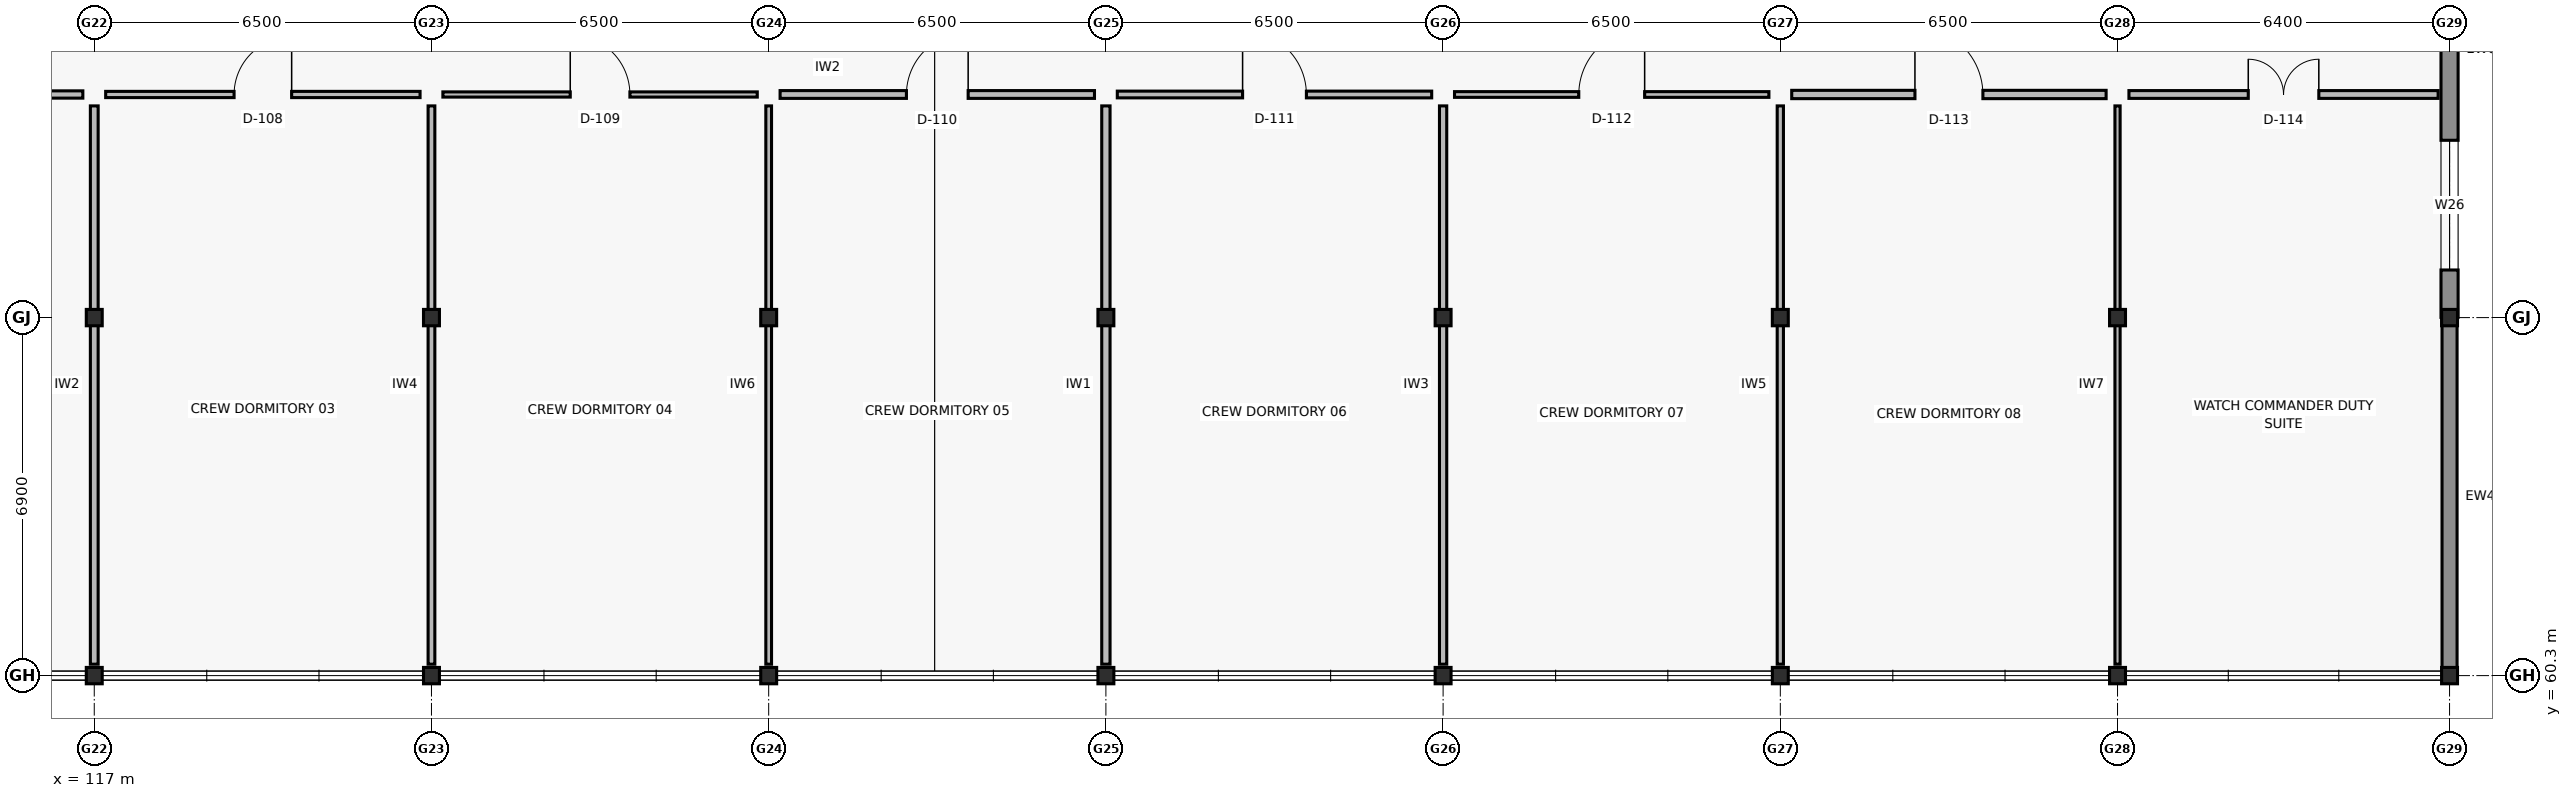
"""IFC4 building model, lengths in metres.
Left out: names, types, materials, properties, quantities, classifications, styles, units other than length and angle.
Written with IfcOpenShell. Run it as: python <this file> out.ifc"""

import sys

from ifc_helpers import new_model, si_unit, direction, frame, frame_2d, origin, origin_2d, place, context, subcontext, project, spatial, rectangle, i_section, extrude, element, fill, save


model = new_model("IFC4")
c1 = context("Model", 3, precision=1e-05, world=origin(), true_north=direction((0.0, 1.0)))
c2 = subcontext(c1, "Body", "Model", "MODEL_VIEW")
j1 = project(units=[si_unit("LENGTHUNIT", "METRE"), si_unit("PLANEANGLEUNIT", "RADIAN")], contexts=[c1])
p1 = place(None, origin())
s1 = spatial("IfcSite", under=j1, at=p1, CompositionType="ELEMENT")
p2 = place(p1, origin())
s2 = spatial("IfcBuilding", under=s1, at=p2, CompositionType="ELEMENT")
p3 = place(p2, frame((0.0, 0.0, 9.6)))
s3 = spatial("IfcBuildingStorey", under=s2, at=p3, CompositionType="ELEMENT", Elevation=9.6)
for number, where, z_axis, x_axis in (
    (1, (117.0, 60.3, 0.0), (0.0, 0.0, 1.0), (1.0, 0.0, 0.0)),
    (2, (117.0, 67.2, 0.0), (0.0, 0.0, 1.0), (1.0, 0.0, 0.0)),
    (3, (123.5, 60.3, 0.0), (0.0, 0.0, 1.0), (1.0, 0.0, 0.0)),
    (4, (123.5, 67.2, 0.0), (0.0, 0.0, 1.0), (1.0, 0.0, 0.0)),
    (5, (130.0, 60.3, 0.0), (0.0, 0.0, 1.0), (1.0, 0.0, 0.0)),
    (6, (130.0, 67.2, 0.0), (0.0, 0.0, 1.0), (1.0, 0.0, 0.0)),
    (7, (136.5, 60.3, 0.0), (0.0, 0.0, 1.0), (1.0, 0.0, 0.0)),
    (8, (136.5, 67.2, 0.0), (0.0, 0.0, 1.0), (1.0, 0.0, 0.0)),
    (9, (143.0, 60.3, 0.0), (0.0, 0.0, 1.0), (1.0, 0.0, 0.0)),
    (10, (143.0, 67.2, 0.0), (0.0, 0.0, 1.0), (1.0, 0.0, 0.0)),
    (11, (149.5, 60.3, 0.0), (0.0, 0.0, 1.0), (1.0, 0.0, 0.0)),
    (12, (149.5, 67.2, 0.0), (0.0, 0.0, 1.0), (1.0, 0.0, 0.0)),
    (13, (156.0, 60.3, 0.0), (0.0, 0.0, 1.0), (1.0, 0.0, 0.0)),
    (14, (156.0, 67.2, 0.0), (0.0, 0.0, 1.0), (1.0, 0.0, 0.0)),
    (15, (162.4, 60.3, 0.0), (0.0, 0.0, 1.0), (1.0, 0.0, 0.0)),
    (16, (162.4, 67.2, 0.0), (0.0, 0.0, 1.0), (1.0, 0.0, 0.0)),
):
    element("IfcColumn", number, at=place(p3, frame(where, z_axis=z_axis, x_axis=x_axis)), inside=s3, PredefinedType="COLUMN", context=c2, shape_type="SweptSolid", body=[
        extrude(i_section(OverallWidth=0.307, OverallDepth=0.315, WebThickness=0.012, FlangeThickness=0.019, FilletRadius=0.017, at=origin_2d()), origin(), (0.0, 0.0, 1.0), 3.9),
    ])
p4 = place(p3, frame((162.4, 67.195, 0.0), z_axis=(0.0, 0.0, 1.0), x_axis=(0.0, -1.0, 0.0)))
e17 = element("IfcWall", 17, at=p4, inside=s3, PredefinedType="SOLIDWALL", context=c2, shape_type="SweptSolid", body=[
    extrude(rectangle(XDim=6.89, YDim=0.29, at=frame_2d((3.445, 0.0))), origin(), (0.0, 0.0, 1.0), 3.02),
])
p5 = place(p3, frame((162.4, 74.095, 0.0), z_axis=(0.0, 0.0, 1.0), x_axis=(0.0, -1.0, 0.0)))
e18 = element("IfcWall", 18, at=p5, inside=s3, PredefinedType="SOLIDWALL", context=c2, shape_type="SweptSolid", body=[
    extrude(rectangle(XDim=6.89, YDim=0.33, at=frame_2d((3.445, 0.0))), origin(), (0.0, 0.0, 1.0), 3.02),
])
p6 = place(p5, frame((3.478, 0.0, 0.8)))
e19 = element("IfcOpeningElement", 19, at=p6, cuts=e18, PredefinedType="OPENING", context=c2, shape_type="SweptSolid", body=[
    extrude(rectangle(XDim=2.5, YDim=1.15, at=frame_2d((1.25, 0.575))), frame((0.0, 0.175, 0.0), z_axis=(0.0, -1.0, 0.0), x_axis=(1.0, 0.0, 0.0)), (0.0, 0.0, 1.0), 0.35),
])
p7 = place(p3, frame((117.0, 60.52, 0.0), z_axis=(0.0, 0.0, 1.0), x_axis=(0.0, 1.0, 0.0)))
e20 = element("IfcWall", 20, at=p7, inside=s3, PredefinedType="PARTITIONING", context=c2, shape_type="SweptSolid", body=[
    extrude(rectangle(XDim=10.76, YDim=0.15, at=frame_2d((5.38, 0.0))), origin(), (0.0, 0.0, 1.0), 3.0),
])
p8 = place(p3, frame((110.72, 71.5, 0.0), z_axis=(0.0, 0.0, 1.0), x_axis=(1.0, 0.0, 0.0)))
e21 = element("IfcWall", 21, at=p8, inside=s3, PredefinedType="PARTITIONING", context=c2, shape_type="SweptSolid", body=[
    extrude(rectangle(XDim=6.06, YDim=0.14, at=frame_2d((3.03, 0.0))), origin(), (0.0, 0.0, 1.0), 3.0),
])
p9 = place(p8, frame((2.495, 0.0, 0.0)))
e22 = element("IfcOpeningElement", 22, at=p9, cuts=e21, PredefinedType="OPENING", context=c2, shape_type="SweptSolid", body=[
    extrude(rectangle(XDim=1.07, YDim=2.08, at=frame_2d((0.535, 1.04))), frame((0.0, 0.08, 0.0), z_axis=(0.0, -1.0, 0.0), x_axis=(1.0, 0.0, 0.0)), (0.0, 0.0, 1.0), 0.16),
])
p10 = place(p3, frame((123.5, 60.52, 0.0), z_axis=(0.0, 0.0, 1.0), x_axis=(0.0, 1.0, 0.0)))
e23 = element("IfcWall", 23, at=p10, inside=s3, PredefinedType="PARTITIONING", context=c2, shape_type="SweptSolid", body=[
    extrude(rectangle(XDim=10.76, YDim=0.13, at=frame_2d((5.38, 0.0))), origin(), (0.0, 0.0, 1.0), 3.0),
])
p11 = place(p3, frame((117.22, 71.5, 0.0), z_axis=(0.0, 0.0, 1.0), x_axis=(1.0, 0.0, 0.0)))
e24 = element("IfcWall", 24, at=p11, inside=s3, PredefinedType="PARTITIONING", context=c2, shape_type="SweptSolid", body=[
    extrude(rectangle(XDim=6.06, YDim=0.12, at=frame_2d((3.03, 0.0))), origin(), (0.0, 0.0, 1.0), 3.0),
])
p12 = place(p11, frame((2.475, 0.0, 0.0)))
e25 = element("IfcOpeningElement", 25, at=p12, cuts=e24, PredefinedType="OPENING", context=c2, shape_type="SweptSolid", body=[
    extrude(rectangle(XDim=1.11, YDim=2.1, at=frame_2d((0.555, 1.05))), frame((0.0, 0.07, 0.0), z_axis=(0.0, -1.0, 0.0), x_axis=(1.0, 0.0, 0.0)), (0.0, 0.0, 1.0), 0.14),
])
p13 = place(p3, frame((130.0, 60.52, 0.0), z_axis=(0.0, 0.0, 1.0), x_axis=(0.0, 1.0, 0.0)))
e26 = element("IfcWall", 26, at=p13, inside=s3, PredefinedType="PARTITIONING", context=c2, shape_type="SweptSolid", body=[
    extrude(rectangle(XDim=10.76, YDim=0.11, at=frame_2d((5.38, 0.0))), origin(), (0.0, 0.0, 1.0), 3.0),
])
p14 = place(p3, frame((123.72, 71.5, 0.0), z_axis=(0.0, 0.0, 1.0), x_axis=(1.0, 0.0, 0.0)))
e27 = element("IfcWall", 27, at=p14, inside=s3, PredefinedType="PARTITIONING", context=c2, shape_type="SweptSolid", body=[
    extrude(rectangle(XDim=6.06, YDim=0.1, at=frame_2d((3.03, 0.0))), origin(), (0.0, 0.0, 1.0), 3.0),
])
p15 = place(p14, frame((2.455, 0.0, 0.0)))
e28 = element("IfcOpeningElement", 28, at=p15, cuts=e27, PredefinedType="OPENING", context=c2, shape_type="SweptSolid", body=[
    extrude(rectangle(XDim=1.15, YDim=2.12, at=frame_2d((0.575, 1.06))), frame((0.0, 0.06, 0.0), z_axis=(0.0, -1.0, 0.0), x_axis=(1.0, 0.0, 0.0)), (0.0, 0.0, 1.0), 0.12),
])
p16 = place(p3, frame((136.5, 60.52, 0.0), z_axis=(0.0, 0.0, 1.0), x_axis=(0.0, 1.0, 0.0)))
e29 = element("IfcWall", 29, at=p16, inside=s3, PredefinedType="PARTITIONING", context=c2, shape_type="SweptSolid", body=[
    extrude(rectangle(XDim=10.76, YDim=0.16, at=frame_2d((5.38, 0.0))), origin(), (0.0, 0.0, 1.0), 3.0),
])
p17 = place(p3, frame((130.22, 71.5, 0.0), z_axis=(0.0, 0.0, 1.0), x_axis=(1.0, 0.0, 0.0)))
e30 = element("IfcWall", 30, at=p17, inside=s3, PredefinedType="PARTITIONING", context=c2, shape_type="SweptSolid", body=[
    extrude(rectangle(XDim=6.06, YDim=0.15, at=frame_2d((3.03, 0.0))), origin(), (0.0, 0.0, 1.0), 3.0),
])
p18 = place(p17, frame((2.435, 0.0, 0.0)))
e31 = element("IfcOpeningElement", 31, at=p18, cuts=e30, PredefinedType="OPENING", context=c2, shape_type="SweptSolid", body=[
    extrude(rectangle(XDim=1.19, YDim=2.14, at=frame_2d((0.595, 1.07))), frame((0.0, 0.085, 0.0), z_axis=(0.0, -1.0, 0.0), x_axis=(1.0, 0.0, 0.0)), (0.0, 0.0, 1.0), 0.17),
])
p19 = place(p3, frame((143.0, 60.52, 0.0), z_axis=(0.0, 0.0, 1.0), x_axis=(0.0, 1.0, 0.0)))
e32 = element("IfcWall", 32, at=p19, inside=s3, PredefinedType="PARTITIONING", context=c2, shape_type="SweptSolid", body=[
    extrude(rectangle(XDim=10.76, YDim=0.14, at=frame_2d((5.38, 0.0))), origin(), (0.0, 0.0, 1.0), 3.0),
])
p20 = place(p3, frame((136.72, 71.5, 0.0), z_axis=(0.0, 0.0, 1.0), x_axis=(1.0, 0.0, 0.0)))
e33 = element("IfcWall", 33, at=p20, inside=s3, PredefinedType="PARTITIONING", context=c2, shape_type="SweptSolid", body=[
    extrude(rectangle(XDim=6.06, YDim=0.13, at=frame_2d((3.03, 0.0))), origin(), (0.0, 0.0, 1.0), 3.0),
])
p21 = place(p20, frame((2.415, 0.0, 0.0)))
e34 = element("IfcOpeningElement", 34, at=p21, cuts=e33, PredefinedType="OPENING", context=c2, shape_type="SweptSolid", body=[
    extrude(rectangle(XDim=1.23, YDim=2.08, at=frame_2d((0.615, 1.04))), frame((0.0, 0.075, 0.0), z_axis=(0.0, -1.0, 0.0), x_axis=(1.0, 0.0, 0.0)), (0.0, 0.0, 1.0), 0.15),
])
p22 = place(p3, frame((149.5, 60.52, 0.0), z_axis=(0.0, 0.0, 1.0), x_axis=(0.0, 1.0, 0.0)))
e35 = element("IfcWall", 35, at=p22, inside=s3, PredefinedType="PARTITIONING", context=c2, shape_type="SweptSolid", body=[
    extrude(rectangle(XDim=10.76, YDim=0.12, at=frame_2d((5.38, 0.0))), origin(), (0.0, 0.0, 1.0), 3.0),
])
p23 = place(p3, frame((143.22, 71.5, 0.0), z_axis=(0.0, 0.0, 1.0), x_axis=(1.0, 0.0, 0.0)))
e36 = element("IfcWall", 36, at=p23, inside=s3, PredefinedType="PARTITIONING", context=c2, shape_type="SweptSolid", body=[
    extrude(rectangle(XDim=6.06, YDim=0.11, at=frame_2d((3.03, 0.0))), origin(), (0.0, 0.0, 1.0), 3.0),
])
p24 = place(p23, frame((2.395, 0.0, 0.0)))
e37 = element("IfcOpeningElement", 37, at=p24, cuts=e36, PredefinedType="OPENING", context=c2, shape_type="SweptSolid", body=[
    extrude(rectangle(XDim=1.27, YDim=2.1, at=frame_2d((0.635, 1.05))), frame((0.0, 0.065, 0.0), z_axis=(0.0, -1.0, 0.0), x_axis=(1.0, 0.0, 0.0)), (0.0, 0.0, 1.0), 0.13),
])
p25 = place(p3, frame((156.0, 60.52, 0.0), z_axis=(0.0, 0.0, 1.0), x_axis=(0.0, 1.0, 0.0)))
e38 = element("IfcWall", 38, at=p25, inside=s3, PredefinedType="PARTITIONING", context=c2, shape_type="SweptSolid", body=[
    extrude(rectangle(XDim=10.76, YDim=0.1, at=frame_2d((5.38, 0.0))), origin(), (0.0, 0.0, 1.0), 3.0),
])
p26 = place(p3, frame((149.72, 71.5, 0.0), z_axis=(0.0, 0.0, 1.0), x_axis=(1.0, 0.0, 0.0)))
e39 = element("IfcWall", 39, at=p26, inside=s3, PredefinedType="PARTITIONING", context=c2, shape_type="SweptSolid", body=[
    extrude(rectangle(XDim=6.06, YDim=0.16, at=frame_2d((3.03, 0.0))), origin(), (0.0, 0.0, 1.0), 3.0),
])
p27 = place(p26, frame((2.375, 0.0, 0.0)))
e40 = element("IfcOpeningElement", 40, at=p27, cuts=e39, PredefinedType="OPENING", context=c2, shape_type="SweptSolid", body=[
    extrude(rectangle(XDim=1.31, YDim=2.14, at=frame_2d((0.655, 1.07))), frame((0.0, 0.09, 0.0), z_axis=(0.0, -1.0, 0.0), x_axis=(1.0, 0.0, 0.0)), (0.0, 0.0, 1.0), 0.18),
])
p28 = place(p3, frame((156.22, 71.5, 0.0), z_axis=(0.0, 0.0, 1.0), x_axis=(1.0, 0.0, 0.0)))
e41 = element("IfcWall", 41, at=p28, inside=s3, PredefinedType="PARTITIONING", context=c2, shape_type="SweptSolid", body=[
    extrude(rectangle(XDim=5.96, YDim=0.15, at=frame_2d((2.98, 0.0))), origin(), (0.0, 0.0, 1.0), 3.0),
])
p29 = place(p28, frame((2.3, 0.0, 0.0)))
e42 = element("IfcOpeningElement", 42, at=p29, cuts=e41, PredefinedType="OPENING", context=c2, shape_type="SweptSolid", body=[
    extrude(rectangle(XDim=1.36, YDim=2.15, at=frame_2d((0.68, 1.075))), frame((0.0, 0.085, 0.0), z_axis=(0.0, -1.0, 0.0), x_axis=(1.0, 0.0, 0.0)), (0.0, 0.0, 1.0), 0.17),
])
p30 = place(p6, origin())
e43 = element("IfcWindow", 43, at=p30, inside=s3, PartitioningType="TRIPLE_PANEL_VERTICAL", PredefinedType="WINDOW", context=c2, shape_type="SweptSolid", body=[
    extrude(rectangle(XDim=2.5, YDim=1.15, at=frame_2d((1.25, 0.575))), frame((0.0, 0.03, 0.0), z_axis=(0.0, -1.0, 0.0), x_axis=(1.0, 0.0, 0.0)), (0.0, 0.0, 1.0), 0.06),
])
fill(e19, e43)
p31 = place(p12, origin())
e44 = element("IfcDoor", 44, at=p31, inside=s3, OperationType="SINGLE_SWING_RIGHT", PredefinedType="DOOR", context=c2, shape_type="SweptSolid", body=[
    extrude(rectangle(XDim=1.11, YDim=2.1, at=frame_2d((0.555, 1.05))), frame((0.0, 0.025, 0.0), z_axis=(0.0, -1.0, 0.0), x_axis=(1.0, 0.0, 0.0)), (0.0, 0.0, 1.0), 0.05),
])
fill(e25, e44)
p32 = place(p15, origin())
e45 = element("IfcDoor", 45, at=p32, inside=s3, OperationType="SINGLE_SWING_LEFT", PredefinedType="DOOR", context=c2, shape_type="SweptSolid", body=[
    extrude(rectangle(XDim=1.15, YDim=2.12, at=frame_2d((0.575, 1.06))), frame((0.0, 0.025, 0.0), z_axis=(0.0, -1.0, 0.0), x_axis=(1.0, 0.0, 0.0)), (0.0, 0.0, 1.0), 0.05),
])
fill(e28, e45)
p33 = place(p18, origin())
e46 = element("IfcDoor", 46, at=p33, inside=s3, OperationType="SINGLE_SWING_RIGHT", PredefinedType="DOOR", context=c2, shape_type="SweptSolid", body=[
    extrude(rectangle(XDim=1.19, YDim=2.14, at=frame_2d((0.595, 1.07))), frame((0.0, 0.025, 0.0), z_axis=(0.0, -1.0, 0.0), x_axis=(1.0, 0.0, 0.0)), (0.0, 0.0, 1.0), 0.05),
])
fill(e31, e46)
p34 = place(p21, origin())
e47 = element("IfcDoor", 47, at=p34, inside=s3, OperationType="SINGLE_SWING_LEFT", PredefinedType="DOOR", context=c2, shape_type="SweptSolid", body=[
    extrude(rectangle(XDim=1.23, YDim=2.08, at=frame_2d((0.615, 1.04))), frame((0.0, 0.025, 0.0), z_axis=(0.0, -1.0, 0.0), x_axis=(1.0, 0.0, 0.0)), (0.0, 0.0, 1.0), 0.05),
])
fill(e34, e47)
p35 = place(p24, origin())
e48 = element("IfcDoor", 48, at=p35, inside=s3, OperationType="SINGLE_SWING_RIGHT", PredefinedType="DOOR", context=c2, shape_type="SweptSolid", body=[
    extrude(rectangle(XDim=1.27, YDim=2.1, at=frame_2d((0.635, 1.05))), frame((0.0, 0.025, 0.0), z_axis=(0.0, -1.0, 0.0), x_axis=(1.0, 0.0, 0.0)), (0.0, 0.0, 1.0), 0.05),
])
fill(e37, e48)
p36 = place(p27, origin())
e49 = element("IfcDoor", 49, at=p36, inside=s3, OperationType="SINGLE_SWING_LEFT", PredefinedType="DOOR", context=c2, shape_type="SweptSolid", body=[
    extrude(rectangle(XDim=1.31, YDim=2.14, at=frame_2d((0.655, 1.07))), frame((0.0, 0.025, 0.0), z_axis=(0.0, -1.0, 0.0), x_axis=(1.0, 0.0, 0.0)), (0.0, 0.0, 1.0), 0.05),
])
fill(e40, e49)
p37 = place(p29, origin())
e50 = element("IfcDoor", 50, at=p37, inside=s3, OperationType="DOUBLE_DOOR_SINGLE_SWING", PredefinedType="DOOR", context=c2, shape_type="SweptSolid", body=[
    extrude(rectangle(XDim=1.36, YDim=2.15, at=frame_2d((0.68, 1.075))), frame((0.0, 0.025, 0.0), z_axis=(0.0, -1.0, 0.0), x_axis=(1.0, 0.0, 0.0)), (0.0, 0.0, 1.0), 0.05),
])
fill(e42, e50)
save(model, sys.argv[1])
